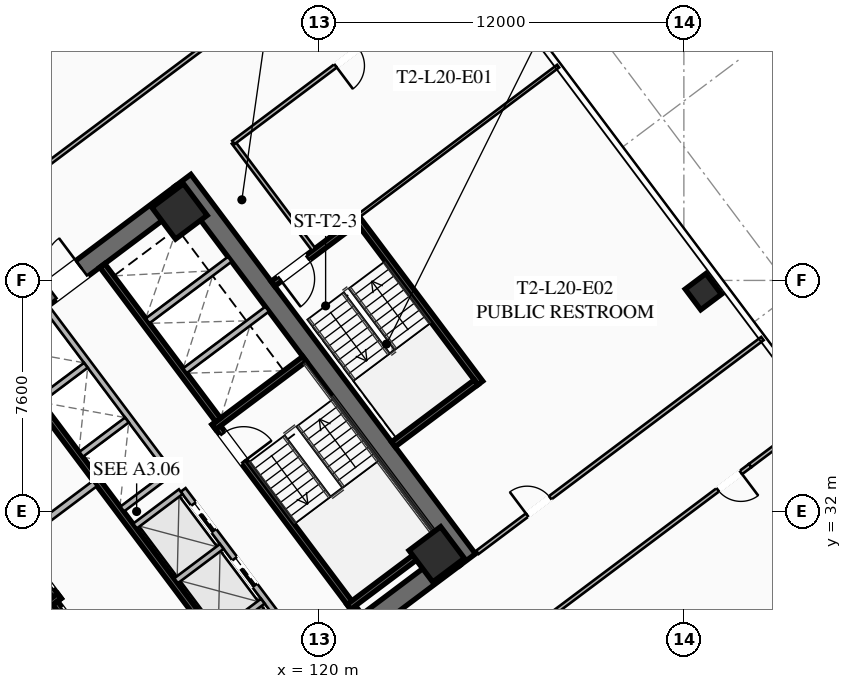
"""IFC4 building model, lengths in metres.
Left out: names, types, materials, properties, quantities, classifications, styles, units other than length and angle.
Written with IfcOpenShell. Run it as: python <this file> out.ifc"""

import sys

from ifc_helpers import new_model, si_unit, direction, frame, frame_2d, origin, origin_2d, place, context, subcontext, project, spatial, rectangle, hollow_rectangle, extrude, element, fill, save


model = new_model("IFC4")
c1 = context("Model", 3, precision=1e-05, world=origin(), true_north=direction((0.0, 1.0)))
c2 = subcontext(c1, "Body", "Model", "MODEL_VIEW")
j1 = project(units=[si_unit("LENGTHUNIT", "METRE"), si_unit("PLANEANGLEUNIT", "RADIAN")], contexts=[c1])
p1 = place(None, origin())
s1 = spatial("IfcSite", under=j1, at=p1, CompositionType="ELEMENT")
p2 = place(p1, origin())
s2 = spatial("IfcBuilding", under=s1, at=p2, CompositionType="ELEMENT")
p3 = place(p2, frame((0.0, 0.0, 77.85)))
s3 = spatial("IfcBuildingStorey", under=s2, at=p3, CompositionType="ELEMENT", Elevation=77.85)
for number, where, z_axis, x_axis in (
    (1, (112.476, 21.107, 0.0), (0.0, 0.0, 1.0), (-0.6, 0.8, 0.0)),
    (2, (115.524, 42.893, 0.0), (0.0, 0.0, 1.0), (0.6, -0.8, 0.0)),
):
    element("IfcWall", number, at=place(p3, frame(where, z_axis=z_axis, x_axis=x_axis)), inside=s3, PredefinedType="SHEAR", context=c2, shape_type="SweptSolid", body=[
        extrude(rectangle(XDim=15.6, YDim=0.65, at=frame_2d((7.8, 0.0))), origin(), (0.0, 0.0, 1.0), 3.55),
    ])
p4 = place(p3, frame((124.429, 30.478, 0.0), z_axis=(0.0, 0.0, 1.0), x_axis=(-0.799998028465, -0.600002628705, 0.0)))
e3 = element("IfcWall", 3, at=p4, inside=s3, PredefinedType="SHEAR", context=c2, shape_type="SweptSolid", body=[
    extrude(rectangle(XDim=14.86, YDim=0.65, at=frame_2d((7.43, 0.0))), origin(), (0.0, 0.0, 1.0), 3.55),
])
p5 = place(p4, frame((9.13, 0.0, 0.0)))
e4 = element("IfcOpeningElement", 4, at=p5, cuts=e3, PredefinedType="OPENING", context=c2, shape_type="SweptSolid", body=[
    extrude(rectangle(XDim=1.25, YDim=2.25, at=frame_2d((0.625, 1.125))), frame((0.0, 0.335, 0.0), z_axis=(0.0, -1.0, 0.0), x_axis=(1.0, 0.0, 0.0)), (0.0, 0.0, 1.0), 0.67),
])
p6 = place(p4, frame((4.08, 0.0, 0.0)))
e5 = element("IfcOpeningElement", 5, at=p6, cuts=e3, PredefinedType="OPENING", context=c2, shape_type="SweptSolid", body=[
    extrude(rectangle(XDim=1.25, YDim=2.25, at=frame_2d((0.625, 1.125))), frame((0.0, 0.335, 0.0), z_axis=(0.0, -1.0, 0.0), x_axis=(1.0, 0.0, 0.0)), (0.0, 0.0, 1.0), 0.67),
])
p7 = place(p3, frame((103.571, 33.522, 0.0), z_axis=(0.0, 0.0, 1.0), x_axis=(0.799998028465, 0.600002628705, 0.0)))
e6 = element("IfcWall", 6, at=p7, inside=s3, PredefinedType="SHEAR", context=c2, shape_type="SweptSolid", body=[
    extrude(rectangle(XDim=14.86, YDim=0.65, at=frame_2d((7.43, 0.0))), origin(), (0.0, 0.0, 1.0), 3.55),
])
p8 = place(p7, frame((4.48, 0.0, 0.0)))
e7 = element("IfcOpeningElement", 7, at=p8, cuts=e6, PredefinedType="OPENING", context=c2, shape_type="SweptSolid", body=[
    extrude(rectangle(XDim=1.25, YDim=2.25, at=frame_2d((0.625, 1.125))), frame((0.0, 0.335, 0.0), z_axis=(0.0, -1.0, 0.0), x_axis=(1.0, 0.0, 0.0)), (0.0, 0.0, 1.0), 0.67),
])
p9 = place(p7, frame((9.53, 0.0, 0.0)))
e8 = element("IfcOpeningElement", 8, at=p9, cuts=e6, PredefinedType="OPENING", context=c2, shape_type="SweptSolid", body=[
    extrude(rectangle(XDim=1.25, YDim=2.25, at=frame_2d((0.625, 1.125))), frame((0.0, 0.335, 0.0), z_axis=(0.0, -1.0, 0.0), x_axis=(1.0, 0.0, 0.0)), (0.0, 0.0, 1.0), 0.67),
])
for number, where, z_axis, x_axis in (
    (9, (123.87, 30.59, 0.0), (0.0, 0.0, 1.0), (0.8, 0.6, 0.0)),
    (10, (115.41, 41.87, 0.0), (0.0, 0.0, 1.0), (0.8, 0.6, 0.0)),
):
    element("IfcColumn", number, at=place(p3, frame(where, z_axis=z_axis, x_axis=x_axis)), inside=s3, PredefinedType="COLUMN", context=c2, shape_type="SweptSolid", body=[
        extrude(hollow_rectangle(XDim=1.3, YDim=1.3, WallThickness=0.05, at=origin_2d()), origin(), (0.0, 0.0, 1.0), 3.35),
    ])
p10 = place(p3, frame((132.64, 39.23, 0.0), z_axis=(0.0, 0.0, 1.0), x_axis=(0.799999996291, 0.600000004945, 0.0)))
e11 = element("IfcColumn", 11, at=p10, inside=s3, PredefinedType="COLUMN", context=c2, shape_type="SweptSolid", body=[
    extrude(hollow_rectangle(XDim=0.85, YDim=0.85, WallThickness=0.035, at=origin_2d()), origin(), (0.0, 0.0, 1.0), 3.35),
])
p11 = place(p3, frame((111.44, 29.08, 0.0), z_axis=(0.0, 0.0, 1.0), x_axis=(-0.600009827119, 0.799992629566, 0.0)))
e12 = element("IfcWall", 12, at=p11, inside=s3, PredefinedType="SHEAR", context=c2, shape_type="SweptSolid", body=[
    extrude(rectangle(XDim=7.95, YDim=0.2, at=frame_2d((3.975, 0.0))), origin(), (0.0, 0.0, 1.0), 3.35),
])
p12 = place(p11, frame((0.45, 0.0, 0.0)))
e13 = element("IfcOpeningElement", 13, at=p12, cuts=e12, PredefinedType="OPENING", context=c2, shape_type="SweptSolid", body=[
    extrude(rectangle(XDim=1.15, YDim=2.2, at=frame_2d((0.575, 1.1))), frame((0.0, 0.11, 0.0), z_axis=(0.0, -1.0, 0.0), x_axis=(1.0, 0.0, 0.0)), (0.0, 0.0, 1.0), 0.22),
])
p13 = place(p3, frame((108.476, 26.982, 0.0), z_axis=(0.0, 0.0, 1.0), x_axis=(0.799984290658, 0.600020945218, 0.0)))
e14 = element("IfcWall", 14, at=p13, inside=s3, PredefinedType="SHEAR", context=c2, shape_type="SweptSolid", body=[
    extrude(rectangle(XDim=3.73, YDim=0.2, at=frame_2d((1.865, 0.0))), origin(), (0.0, 0.0, 1.0), 3.35),
])
p14 = place(p3, frame((116.56, 34.92, 0.0), z_axis=(0.0, 0.0, 1.0), x_axis=(0.600009827119, -0.799992629566, 0.0)))
e15 = element("IfcWall", 15, at=p14, inside=s3, PredefinedType="SHEAR", context=c2, shape_type="SweptSolid", body=[
    extrude(rectangle(XDim=7.95, YDim=0.2, at=frame_2d((3.975, 0.0))), origin(), (0.0, 0.0, 1.0), 3.35),
])
p15 = place(p14, frame((0.45, 0.0, 0.0)))
e16 = element("IfcOpeningElement", 16, at=p15, cuts=e15, PredefinedType="OPENING", context=c2, shape_type="SweptSolid", body=[
    extrude(rectangle(XDim=1.15, YDim=2.2, at=frame_2d((0.575, 1.1))), frame((0.0, 0.11, 0.0), z_axis=(0.0, -1.0, 0.0), x_axis=(1.0, 0.0, 0.0)), (0.0, 0.0, 1.0), 0.22),
])
for number, where, z_axis, x_axis in (
    (17, (116.54, 34.78, 0.0), (0.0, 0.0, 1.0), (0.8, 0.6, 0.0)),
    (18, (120.98, 28.86, 0.0), (0.0, 0.0, 1.0), (0.8, 0.6, 0.0)),
):
    element("IfcWall", number, at=place(p3, frame(where, z_axis=z_axis, x_axis=x_axis)), inside=s3, PredefinedType="SHEAR", context=c2, shape_type="SweptSolid", body=[
        extrude(rectangle(XDim=3.73, YDim=0.2, at=frame_2d((1.865, 0.0))), origin(), (0.0, 0.0, 1.0), 3.35),
    ])
p16 = place(p3, frame((117.938, 26.016, 0.0), z_axis=(0.0, 0.0, 1.0), x_axis=(-0.600005463273, 0.799995902516, 0.0)))
e19 = element("IfcWall", 19, at=p16, inside=s3, PredefinedType="SHEAR", context=c2, shape_type="SweptSolid", body=[
    extrude(rectangle(XDim=14.3, YDim=0.2, at=frame_2d((7.15, 0.0))), origin(), (0.0, 0.0, 1.0), 3.35),
])
p17 = place(p3, frame((110.104, 31.028, 0.0), z_axis=(0.0, 0.0, 1.0), x_axis=(0.800018601094, 0.59997519774, 0.0)))
e20 = element("IfcWall", 20, at=p17, inside=s3, PredefinedType="SOLIDWALL", context=c2, shape_type="SweptSolid", body=[
    extrude(rectangle(XDim=3.15, YDim=0.22, at=frame_2d((1.575, 0.0))), origin(), (0.0, 0.0, 1.0), 2.703),
])
p18 = place(p3, frame((115.13, 23.91, 0.0), z_axis=(0.0, 0.0, 1.0), x_axis=(-0.599975393228, 0.800018454488, 0.0)))
e21 = element("IfcWall", 21, at=p18, inside=s3, PredefinedType="SHEAR", context=c2, shape_type="SweptSolid", body=[
    extrude(rectangle(XDim=6.35, YDim=0.2, at=frame_2d((3.175, 0.0))), origin(), (0.0, 0.0, 1.0), 3.35),
])
p19 = place(p18, frame((4.775, 0.0, 0.0)))
e22 = element("IfcOpeningElement", 22, at=p19, cuts=e21, PredefinedType="OPENING", context=c2, shape_type="SweptSolid", body=[
    extrude(rectangle(XDim=1.3, YDim=2.25, at=frame_2d((0.65, 1.125))), frame((0.0, 0.11, 0.0), z_axis=(0.0, -1.0, 0.0), x_axis=(1.0, 0.0, 0.0)), (0.0, 0.0, 1.0), 0.22),
])
p20 = place(p18, frame((2.775, 0.0, 0.0)))
e23 = element("IfcOpeningElement", 23, at=p20, cuts=e21, PredefinedType="OPENING", context=c2, shape_type="SweptSolid", body=[
    extrude(rectangle(XDim=1.3, YDim=2.25, at=frame_2d((0.65, 1.125))), frame((0.0, 0.11, 0.0), z_axis=(0.0, -1.0, 0.0), x_axis=(1.0, 0.0, 0.0)), (0.0, 0.0, 1.0), 0.22),
])
p21 = place(p18, frame((0.575, 0.0, 0.0)))
e24 = element("IfcOpeningElement", 24, at=p21, cuts=e21, PredefinedType="OPENING", context=c2, shape_type="SweptSolid", body=[
    extrude(rectangle(XDim=1.3, YDim=2.25, at=frame_2d((0.65, 1.125))), frame((0.0, 0.11, 0.0), z_axis=(0.0, -1.0, 0.0), x_axis=(1.0, 0.0, 0.0)), (0.0, 0.0, 1.0), 0.22),
])
p22 = place(p3, frame((112.87, 40.09, 0.0), z_axis=(0.0, 0.0, 1.0), x_axis=(0.599975393228, -0.800018454488, 0.0)))
e25 = element("IfcWall", 25, at=p22, inside=s3, PredefinedType="SHEAR", context=c2, shape_type="SweptSolid", body=[
    extrude(rectangle(XDim=6.35, YDim=0.2, at=frame_2d((3.175, 0.0))), origin(), (0.0, 0.0, 1.0), 3.35),
])
for number, where, z_axis, x_axis in (
    (26, (115.59, 36.63, 0.0), (0.0, 0.0, 1.0), (0.8, 0.6, 0.0)),
    (27, (114.36, 38.27, 0.0), (0.0, 0.0, 1.0), (0.8, 0.6, 0.0)),
):
    element("IfcWall", number, at=place(p3, frame(where, z_axis=z_axis, x_axis=x_axis)), inside=s3, PredefinedType="SOLIDWALL", context=c2, shape_type="SweptSolid", body=[
        extrude(rectangle(XDim=3.38, YDim=0.2, at=frame_2d((1.69, 0.0))), origin(), (0.0, 0.0, 1.0), 3.35),
    ])
p23 = place(p3, frame((119.61, 27.27, 0.0), z_axis=(0.0, 0.0, 1.0), x_axis=(-0.600011488909, 0.79999138319, 0.0)))
e28 = element("IfcWall", 28, at=p23, inside=s3, PredefinedType="SOLIDWALL", context=c2, shape_type="SweptSolid", body=[
    extrude(rectangle(XDim=6.8, YDim=0.2, at=frame_2d((3.4, 0.0))), origin(), (0.0, 0.0, 1.0), 3.35),
])
p24 = place(p23, frame((0.625, 0.0, 0.0)))
e29 = element("IfcOpeningElement", 29, at=p24, cuts=e28, PredefinedType="OPENING", context=c2, shape_type="SweptSolid", body=[
    extrude(rectangle(XDim=1.1, YDim=2.2, at=frame_2d((0.55, 1.1))), frame((0.0, 0.11, 0.0), z_axis=(0.0, -1.0, 0.0), x_axis=(1.0, 0.0, 0.0)), (0.0, 0.0, 1.0), 0.22),
])
p25 = place(p23, frame((2.875, 0.0, 0.0)))
e30 = element("IfcOpeningElement", 30, at=p25, cuts=e28, PredefinedType="OPENING", context=c2, shape_type="SweptSolid", body=[
    extrude(rectangle(XDim=1.1, YDim=2.2, at=frame_2d((0.55, 1.1))), frame((0.0, 0.11, 0.0), z_axis=(0.0, -1.0, 0.0), x_axis=(1.0, 0.0, 0.0)), (0.0, 0.0, 1.0), 0.22),
])
p26 = place(p23, frame((5.125, 0.0, 0.0)))
e31 = element("IfcOpeningElement", 31, at=p26, cuts=e28, PredefinedType="OPENING", context=c2, shape_type="SweptSolid", body=[
    extrude(rectangle(XDim=1.1, YDim=2.2, at=frame_2d((0.55, 1.1))), frame((0.0, 0.11, 0.0), z_axis=(0.0, -1.0, 0.0), x_axis=(1.0, 0.0, 0.0)), (0.0, 0.0, 1.0), 0.22),
])
p27 = place(p3, frame((116.646, 27.922, 0.0), z_axis=(0.0, 0.0, 1.0), x_axis=(0.8, 0.6, 0.0)))
e32 = element("IfcWall", 32, at=p27, inside=s3, PredefinedType="SOLIDWALL", context=c2, shape_type="SweptSolid", body=[
    extrude(rectangle(XDim=1.88, YDim=0.2, at=frame_2d((0.94, 0.0))), origin(), (0.0, 0.0, 1.0), 3.35),
])
p28 = place(p3, frame((115.296, 29.722, 0.0), z_axis=(0.0, 0.0, 1.0), x_axis=(0.799984418148, 0.600020775241, 0.0)))
e33 = element("IfcWall", 33, at=p28, inside=s3, PredefinedType="SOLIDWALL", context=c2, shape_type="SweptSolid", body=[
    extrude(rectangle(XDim=1.88, YDim=0.2, at=frame_2d((0.94, 0.0))), origin(), (0.0, 0.0, 1.0), 3.35),
])
p29 = place(p3, frame((113.946, 31.522, 0.0), z_axis=(0.0, 0.0, 1.0), x_axis=(0.8, 0.6, 0.0)))
e34 = element("IfcWall", 34, at=p29, inside=s3, PredefinedType="SOLIDWALL", context=c2, shape_type="SweptSolid", body=[
    extrude(rectangle(XDim=1.88, YDim=0.2, at=frame_2d((0.94, 0.0))), origin(), (0.0, 0.0, 1.0), 3.35),
])
p30 = place(p3, frame((115.11, 33.27, 0.0), z_axis=(0.0, 0.0, 1.0), x_axis=(-0.600011488909, 0.79999138319, 0.0)))
e35 = element("IfcWall", 35, at=p30, inside=s3, PredefinedType="SOLIDWALL", context=c2, shape_type="SweptSolid", body=[
    extrude(rectangle(XDim=6.8, YDim=0.2, at=frame_2d((3.4, 0.0))), origin(), (0.0, 0.0, 1.0), 3.35),
])
p31 = place(p3, frame((113.526, 32.082, 0.0), z_axis=(0.0, 0.0, 1.0), x_axis=(0.800046745961, 0.599937666993, 0.0)))
e36 = element("IfcWall", 36, at=p31, inside=s3, PredefinedType="SOLIDWALL", context=c2, shape_type="SweptSolid", body=[
    extrude(rectangle(XDim=1.88, YDim=0.2, at=frame_2d((0.94, 0.0))), origin(), (0.0, 0.0, 1.0), 3.35),
])
p32 = place(p3, frame((112.176, 33.882, 0.0), z_axis=(0.0, 0.0, 1.0), x_axis=(0.8, 0.6, 0.0)))
e37 = element("IfcWall", 37, at=p32, inside=s3, PredefinedType="SOLIDWALL", context=c2, shape_type="SweptSolid", body=[
    extrude(rectangle(XDim=1.88, YDim=0.2, at=frame_2d((0.94, 0.0))), origin(), (0.0, 0.0, 1.0), 3.35),
])
p33 = place(p3, frame((110.826, 35.682, 0.0), z_axis=(0.0, 0.0, 1.0), x_axis=(0.799984418148, 0.600020775241, 0.0)))
e38 = element("IfcWall", 38, at=p33, inside=s3, PredefinedType="SOLIDWALL", context=c2, shape_type="SweptSolid", body=[
    extrude(rectangle(XDim=1.88, YDim=0.2, at=frame_2d((0.94, 0.0))), origin(), (0.0, 0.0, 1.0), 3.35),
])
p34 = place(p3, frame((125.304, 36.228, 0.0), z_axis=(0.0, 0.0, 1.0), x_axis=(-0.59998851072, 0.800008616831, 0.0)))
e39 = element("IfcWall", 39, at=p34, inside=s3, PredefinedType="SHEAR", context=c2, shape_type="SweptSolid", body=[
    extrude(rectangle(XDim=6.8, YDim=0.2, at=frame_2d((3.4, 0.0))), origin(), (0.0, 0.0, 1.0), 3.35),
])
p35 = place(p3, frame((121.204, 41.528, 0.0), z_axis=(0.0, 0.0, 1.0), x_axis=(-0.800017232136, -0.599977023131, 0.0)))
e40 = element("IfcWall", 40, at=p35, inside=s3, PredefinedType="SHEAR", context=c2, shape_type="SweptSolid", body=[
    extrude(rectangle(XDim=3.4, YDim=0.2, at=frame_2d((1.7, 0.0))), origin(), (0.0, 0.0, 1.0), 3.35),
])
p36 = place(p35, frame((1.975, 0.0, 0.0)))
e41 = element("IfcOpeningElement", 41, at=p36, cuts=e40, PredefinedType="OPENING", context=c2, shape_type="SweptSolid", body=[
    extrude(rectangle(XDim=1.15, YDim=2.2, at=frame_2d((0.575, 1.1))), frame((0.0, 0.11, 0.0), z_axis=(0.0, -1.0, 0.0), x_axis=(1.0, 0.0, 0.0)), (0.0, 0.0, 1.0), 0.22),
])
p37 = place(p3, frame((122.444, 34.208, 0.0), z_axis=(0.0, 0.0, 1.0), x_axis=(0.79999138319, 0.600011488909, 0.0)))
e42 = element("IfcWall", 42, at=p37, inside=s3, PredefinedType="SHEAR", context=c2, shape_type="SweptSolid", body=[
    extrude(rectangle(XDim=3.4, YDim=0.2, at=frame_2d((1.7, 0.0))), origin(), (0.0, 0.0, 1.0), 3.35),
])
p38 = place(p3, frame((119.824, 40.618, 0.0), z_axis=(0.0, 0.0, 1.0), x_axis=(-0.599982243973, 0.800013316712, 0.0)))
e43 = element("IfcWall", 43, at=p38, inside=s3, PredefinedType="PARTITIONING", context=c2, shape_type="SweptSolid", body=[
    extrude(rectangle(XDim=4.4, YDim=0.135, at=frame_2d((2.2, 0.0))), origin(), (0.0, 0.0, 1.0), 2.703),
])
p39 = place(p3, frame((98.516, 34.012, 0.0), z_axis=(0.0, 0.0, 1.0), x_axis=(0.8, 0.6, 0.0)))
e44 = element("IfcWall", 44, at=p39, inside=s3, PredefinedType="PARTITIONING", context=c2, shape_type="SweptSolid", body=[
    extrude(rectangle(XDim=28.23, YDim=0.135, at=frame_2d((14.115, 0.0))), origin(), (0.0, 0.0, 1.0), 2.703),
])
p40 = place(p39, frame((0.3, 0.0, 0.0)))
e45 = element("IfcOpeningElement", 45, at=p40, cuts=e44, PredefinedType="OPENING", context=c2, shape_type="SweptSolid", body=[
    extrude(rectangle(XDim=0.95, YDim=2.05, at=frame_2d((0.475, 1.025))), frame((0.0, 0.077, 0.0), z_axis=(0.0, -1.0, 0.0), x_axis=(1.0, 0.0, 0.0)), (0.0, 0.0, 1.0), 0.155),
])
p41 = place(p39, frame((11.004, 0.0, 0.0)))
e46 = element("IfcOpeningElement", 46, at=p41, cuts=e44, PredefinedType="OPENING", context=c2, shape_type="SweptSolid", body=[
    extrude(rectangle(XDim=0.95, YDim=2.05, at=frame_2d((0.475, 1.025))), frame((0.0, 0.077, 0.0), z_axis=(0.0, -1.0, 0.0), x_axis=(1.0, 0.0, 0.0)), (0.0, 0.0, 1.0), 0.155),
])
p42 = place(p39, frame((26.98, 0.0, 0.0)))
e47 = element("IfcOpeningElement", 47, at=p42, cuts=e44, PredefinedType="OPENING", context=c2, shape_type="SweptSolid", body=[
    extrude(rectangle(XDim=0.95, YDim=2.05, at=frame_2d((0.475, 1.025))), frame((0.0, 0.077, 0.0), z_axis=(0.0, -1.0, 0.0), x_axis=(1.0, 0.0, 0.0)), (0.0, 0.0, 1.0), 0.155),
])
p43 = place(p3, frame((134.18, 33.51, 0.0), z_axis=(0.0, 0.0, 1.0), x_axis=(-0.8, -0.6, 0.0)))
e48 = element("IfcWall", 48, at=p43, inside=s3, PredefinedType="PARTITIONING", context=c2, shape_type="SweptSolid", body=[
    extrude(rectangle(XDim=28.23, YDim=0.135, at=frame_2d((14.115, 0.0))), origin(), (0.0, 0.0, 1.0), 2.703),
])
p44 = place(p43, frame((26.9, 0.0, 0.0)))
e49 = element("IfcOpeningElement", 49, at=p44, cuts=e48, PredefinedType="OPENING", context=c2, shape_type="SweptSolid", body=[
    extrude(rectangle(XDim=0.95, YDim=2.05, at=frame_2d((0.475, 1.025))), frame((0.0, 0.077, 0.0), z_axis=(0.0, -1.0, 0.0), x_axis=(1.0, 0.0, 0.0)), (0.0, 0.0, 1.0), 0.155),
])
p45 = place(p43, frame((16.453, 0.0, 0.0)))
e50 = element("IfcOpeningElement", 50, at=p45, cuts=e48, PredefinedType="OPENING", context=c2, shape_type="SweptSolid", body=[
    extrude(rectangle(XDim=0.95, YDim=2.05, at=frame_2d((0.475, 1.025))), frame((0.0, 0.077, 0.0), z_axis=(0.0, -1.0, 0.0), x_axis=(1.0, 0.0, 0.0)), (0.0, 0.0, 1.0), 0.155),
])
p46 = place(p43, frame((0.38, 0.0, 0.0)))
e51 = element("IfcOpeningElement", 51, at=p46, cuts=e48, PredefinedType="OPENING", context=c2, shape_type="SweptSolid", body=[
    extrude(rectangle(XDim=0.95, YDim=2.05, at=frame_2d((0.475, 1.025))), frame((0.0, 0.077, 0.0), z_axis=(0.0, -1.0, 0.0), x_axis=(1.0, 0.0, 0.0)), (0.0, 0.0, 1.0), 0.155),
])
p47 = place(p3, frame((134.18, 33.51, 0.0), z_axis=(0.0, 0.0, 1.0), x_axis=(0.8000207031, 0.599972394874, 0.0)))
e52 = element("IfcWall", 52, at=p47, inside=s3, PredefinedType="PARTITIONING", context=c2, shape_type="SweptSolid", body=[
    extrude(rectangle(XDim=2.83, YDim=0.135, at=frame_2d((1.415, 0.0))), origin(), (0.0, 0.0, 1.0), 2.703),
])
p48 = place(p3, frame((125.224, 50.168, 0.0), z_axis=(0.0, 0.0, 1.0), x_axis=(-0.8, -0.6, 0.0)))
e53 = element("IfcWall", 53, at=p48, inside=s3, PredefinedType="PARTITIONING", context=c2, shape_type="SweptSolid", body=[
    extrude(rectangle(XDim=10.05, YDim=0.135, at=frame_2d((5.025, 0.0))), origin(), (0.0, 0.0, 1.0), 2.703),
])
p49 = place(p48, frame((4.9, 0.0, 0.0)))
e54 = element("IfcOpeningElement", 54, at=p49, cuts=e53, PredefinedType="OPENING", context=c2, shape_type="SweptSolid", body=[
    extrude(rectangle(XDim=0.95, YDim=2.05, at=frame_2d((0.475, 1.025))), frame((0.0, 0.077, 0.0), z_axis=(0.0, -1.0, 0.0), x_axis=(1.0, 0.0, 0.0)), (0.0, 0.0, 1.0), 0.155),
])
p50 = place(p3, frame((125.208, 30.656, 0.0), z_axis=(0.0, 0.0, 1.0), x_axis=(0.8, 0.6, 0.0)))
e55 = element("IfcWall", 55, at=p50, inside=s3, PredefinedType="PARTITIONING", context=c2, shape_type="SweptSolid", body=[
    extrude(rectangle(XDim=11.72, YDim=0.135, at=frame_2d((5.86, 0.0))), origin(), (0.0, 0.0, 1.0), 2.703),
])
p51 = place(p50, frame((2.045, 0.0, 0.0)))
e56 = element("IfcOpeningElement", 56, at=p51, cuts=e55, PredefinedType="OPENING", context=c2, shape_type="SweptSolid", body=[
    extrude(rectangle(XDim=0.95, YDim=2.05, at=frame_2d((0.475, 1.025))), frame((0.0, 0.077, 0.0), z_axis=(0.0, -1.0, 0.0), x_axis=(1.0, 0.0, 0.0)), (0.0, 0.0, 1.0), 0.155),
])
p52 = place(p3, frame((127.864, 46.648, 0.0), z_axis=(0.0, 0.0, 1.0), x_axis=(-0.800007145523, -0.599990472518, 0.0)))
e57 = element("IfcWall", 57, at=p52, inside=s3, PredefinedType="PARTITIONING", context=c2, shape_type="SweptSolid", body=[
    extrude(rectangle(XDim=8.2, YDim=0.11, at=frame_2d((4.1, 0.0))), origin(), (0.0, 0.0, 1.0), 2.703),
])
p53 = place(p3, frame((111.548, 16.636, 0.0), z_axis=(0.0, 0.0, 1.0), x_axis=(-0.600003610192, 0.799997292343, 0.0)))
e58 = element("IfcWall", 58, at=p53, inside=s3, PredefinedType="PARTITIONING", context=c2, shape_type="SweptSolid", body=[
    extrude(rectangle(XDim=21.64, YDim=0.135, at=frame_2d((10.82, 0.0))), origin(), (0.0, 0.0, 1.0), 2.703),
])
p54 = place(p53, frame((0.3, 0.0, 0.0)))
e59 = element("IfcOpeningElement", 59, at=p54, cuts=e58, PredefinedType="OPENING", context=c2, shape_type="SweptSolid", body=[
    extrude(rectangle(XDim=0.95, YDim=2.05, at=frame_2d((0.475, 1.025))), frame((0.0, 0.077, 0.0), z_axis=(0.0, -1.0, 0.0), x_axis=(1.0, 0.0, 0.0)), (0.0, 0.0, 1.0), 0.155),
])
p55 = place(p9, origin())
e60 = element("IfcDoor", 60, at=p55, inside=s3, OperationType="SINGLE_SWING_RIGHT", PredefinedType="DOOR", context=c2, shape_type="SweptSolid", body=[
    extrude(rectangle(XDim=1.25, YDim=2.25, at=frame_2d((0.625, 1.125))), frame((0.0, 0.025, 0.0), z_axis=(0.0, -1.0, 0.0), x_axis=(1.0, 0.0, 0.0)), (0.0, 0.0, 1.0), 0.05),
])
fill(e8, e60)
p56 = place(p15, origin())
e61 = element("IfcDoor", 61, at=p56, inside=s3, OperationType="SINGLE_SWING_RIGHT", PredefinedType="DOOR", context=c2, shape_type="SweptSolid", body=[
    extrude(rectangle(XDim=1.15, YDim=2.2, at=frame_2d((0.575, 1.1))), frame((0.0, 0.025, 0.0), z_axis=(0.0, -1.0, 0.0), x_axis=(1.0, 0.0, 0.0)), (0.0, 0.0, 1.0), 0.05),
])
fill(e16, e61)
p57 = place(p36, origin())
e62 = element("IfcDoor", 62, at=p57, inside=s3, OperationType="SINGLE_SWING_RIGHT", PredefinedType="DOOR", context=c2, shape_type="SweptSolid", body=[
    extrude(rectangle(XDim=1.15, YDim=2.2, at=frame_2d((0.575, 1.1))), frame((0.0, 0.025, 0.0), z_axis=(0.0, -1.0, 0.0), x_axis=(1.0, 0.0, 0.0)), (0.0, 0.0, 1.0), 0.05),
])
fill(e41, e62)
p58 = place(p46, origin())
e63 = element("IfcDoor", 63, at=p58, inside=s3, OperationType="SINGLE_SWING_LEFT", PredefinedType="DOOR", context=c2, shape_type="SweptSolid", body=[
    extrude(rectangle(XDim=0.95, YDim=2.05, at=frame_2d((0.475, 1.025))), frame((0.0, 0.025, 0.0), z_axis=(0.0, -1.0, 0.0), x_axis=(1.0, 0.0, 0.0)), (0.0, 0.0, 1.0), 0.05),
])
fill(e51, e63)
p59 = place(p49, origin())
e64 = element("IfcDoor", 64, at=p59, inside=s3, OperationType="SINGLE_SWING_RIGHT", PredefinedType="DOOR", context=c2, shape_type="SweptSolid", body=[
    extrude(rectangle(XDim=0.95, YDim=2.05, at=frame_2d((0.475, 1.025))), frame((0.0, 0.025, 0.0), z_axis=(0.0, -1.0, 0.0), x_axis=(1.0, 0.0, 0.0)), (0.0, 0.0, 1.0), 0.05),
])
fill(e54, e64)
p60 = place(p51, origin())
e65 = element("IfcDoor", 65, at=p60, inside=s3, OperationType="SINGLE_SWING_LEFT", PredefinedType="DOOR", context=c2, shape_type="SweptSolid", body=[
    extrude(rectangle(XDim=0.95, YDim=2.05, at=frame_2d((0.475, 1.025))), frame((0.0, 0.025, 0.0), z_axis=(0.0, -1.0, 0.0), x_axis=(1.0, 0.0, 0.0)), (0.0, 0.0, 1.0), 0.05),
])
fill(e56, e65)
p61 = place(p25, origin())
e66 = element("IfcDoor", 66, at=p61, inside=s3, OperationType="SLIDING_TO_LEFT", PredefinedType="DOOR", context=c2, shape_type="SweptSolid", body=[
    extrude(rectangle(XDim=1.1, YDim=2.2, at=frame_2d((0.55, 1.1))), frame((0.0, 0.025, 0.0), z_axis=(0.0, -1.0, 0.0), x_axis=(1.0, 0.0, 0.0)), (0.0, 0.0, 1.0), 0.05),
])
fill(e30, e66)
p62 = place(p26, origin())
e67 = element("IfcDoor", 67, at=p62, inside=s3, OperationType="SLIDING_TO_LEFT", PredefinedType="DOOR", context=c2, shape_type="SweptSolid", body=[
    extrude(rectangle(XDim=1.1, YDim=2.2, at=frame_2d((0.55, 1.1))), frame((0.0, 0.025, 0.0), z_axis=(0.0, -1.0, 0.0), x_axis=(1.0, 0.0, 0.0)), (0.0, 0.0, 1.0), 0.05),
])
fill(e31, e67)
save(model, sys.argv[1])
